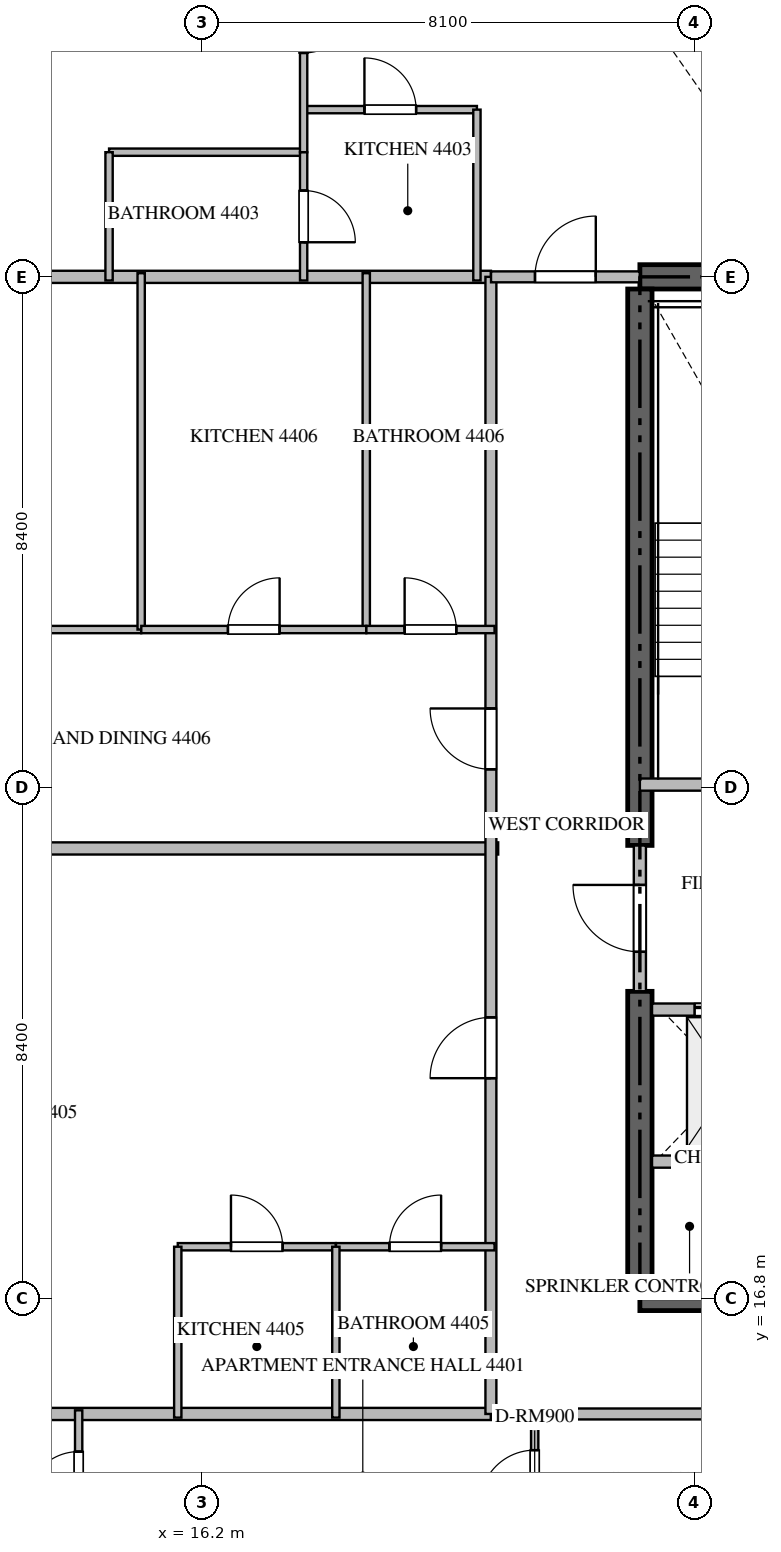
"""IFC4 building model, lengths in metres.
Left out: names, types, materials, properties, quantities, classifications, styles, units other than length and angle.
Written with IfcOpenShell. Run it as: python <this file> out.ifc"""

import sys

from ifc_helpers import new_model, si_unit, direction, frame, frame_2d, origin, place, context, subcontext, project, spatial, rectangle, extrude, source, transform, mapped, element, fill, save


model = new_model("IFC4")
c1 = context("Model", 3, precision=1e-05, world=origin(), true_north=direction((0.0, 1.0)))
c2 = subcontext(c1, "Body", "Model", "MODEL_VIEW")
j1 = project(units=[si_unit("LENGTHUNIT", "METRE"), si_unit("PLANEANGLEUNIT", "RADIAN")], contexts=[c1])
p1 = place(None, origin())
s1 = spatial("IfcSite", under=j1, at=p1, CompositionType="ELEMENT")
p2 = place(p1, origin())
s2 = spatial("IfcBuilding", under=s1, at=p2, CompositionType="ELEMENT")
p3 = place(p2, frame((0.0, 0.0, 176.4)))
s3 = spatial("IfcBuildingStorey", under=s2, at=p3, CompositionType="ELEMENT", Elevation=176.4)
for number, where, z_axis, x_axis in (
    (1, (23.4, 16.8, -0.26), (0.0, 0.0, 1.0), (1.0, 0.0, 0.0)),
    (2, (41.4, 33.6, -0.26), (0.0, 0.0, 1.0), (-1.0, 0.0, 0.0)),
):
    element("IfcWall", number, at=place(p3, frame(where, z_axis=z_axis, x_axis=x_axis)), inside=s3, PredefinedType="SHEAR", context=c2, shape_type="SweptSolid", body=[
        extrude(rectangle(XDim=18.0, YDim=0.4, at=frame_2d((9.0, 0.0))), origin(), (0.0, 0.0, 1.0), 3.748),
    ])
p4 = place(p3, frame((23.4, 17.0, -0.26), z_axis=(0.0, 0.0, 1.0), x_axis=(0.0, 1.0, 0.0)))
e3 = element("IfcWall", 3, at=p4, inside=s3, PredefinedType="SHEAR", context=c2, shape_type="SweptSolid", body=[
    extrude(rectangle(XDim=4.85, YDim=0.4, at=frame_2d((2.425, 0.0))), origin(), (0.0, 0.0, 1.0), 3.748),
])
p5 = place(p3, frame((23.4, 24.25, -0.26), z_axis=(0.0, 0.0, 1.0), x_axis=(0.0, 1.0, 0.0)))
e4 = element("IfcWall", 4, at=p5, inside=s3, PredefinedType="SHEAR", context=c2, shape_type="SweptSolid", body=[
    extrude(rectangle(XDim=9.15, YDim=0.4, at=frame_2d((4.575, 0.0))), origin(), (0.0, 0.0, 1.0), 3.748),
])
p6 = place(p3, frame((23.4, 25.25, 0.0), z_axis=(0.0, 0.0, 1.0), x_axis=(1.0, 0.0, 0.0)))
e5 = element("IfcWall", 5, at=p6, inside=s3, PredefinedType="STANDARD", context=c2, shape_type="SweptSolid", body=[
    extrude(rectangle(XDim=4.45, YDim=0.2, at=frame_2d((2.225, 0.0))), origin(), (0.0, 0.0, 1.0), 3.49),
])
p7 = place(p6, frame((1.65, 0.0, 0.0)))
e6 = element("IfcOpeningElement", 6, at=p7, cuts=e5, PredefinedType="OPENING", context=c2, shape_type="SweptSolid", body=[
    extrude(rectangle(XDim=1.1, YDim=2.15, at=frame_2d((0.55, 1.075))), frame((0.0, 0.11, 0.0), z_axis=(0.0, -1.0, 0.0), x_axis=(1.0, 0.0, 0.0)), (0.0, 0.0, 1.0), 0.22),
])
p8 = place(p3, frame((23.6, 21.55, 0.0), z_axis=(0.0, 0.0, 1.0), x_axis=(1.0, 0.0, 0.0)))
e7 = element("IfcWall", 7, at=p8, inside=s3, PredefinedType="STANDARD", context=c2, shape_type="SweptSolid", body=[
    extrude(rectangle(XDim=2.45, YDim=0.2, at=frame_2d((1.225, 0.0))), origin(), (0.0, 0.0, 1.0), 3.49),
])
p9 = place(p8, frame((0.7, 0.0, 0.0)))
e8 = element("IfcOpeningElement", 8, at=p9, cuts=e7, PredefinedType="OPENING", context=c2, shape_type="SweptSolid", body=[
    extrude(rectangle(XDim=1.2, YDim=2.2, at=frame_2d((0.6, 1.1))), frame((0.0, 0.11, 0.0), z_axis=(0.0, -1.0, 0.0), x_axis=(1.0, 0.0, 0.0)), (0.0, 0.0, 1.0), 0.22),
])
p10 = place(p3, frame((23.6, 19.05, 0.0), z_axis=(0.0, 0.0, 1.0), x_axis=(1.0, 0.0, 0.0)))
e9 = element("IfcWall", 9, at=p10, inside=s3, PredefinedType="STANDARD", context=c2, shape_type="SweptSolid", body=[
    extrude(rectangle(XDim=2.45, YDim=0.2, at=frame_2d((1.225, 0.0))), origin(), (0.0, 0.0, 1.0), 3.49),
])
p11 = place(p3, frame((23.4, 21.852, 0.0), z_axis=(0.0, 0.0, 1.0), x_axis=(0.0, 1.0, 0.0)))
e10 = element("IfcWall", 10, at=p11, inside=s3, PredefinedType="STANDARD", context=c2, shape_type="SweptSolid", body=[
    extrude(rectangle(XDim=2.396, YDim=0.2, at=frame_2d((1.198, 0.0))), origin(), (0.0, 0.0, 1.0), 3.49),
])
p12 = place(p11, frame((0.648, 0.0, 0.0)))
e11 = element("IfcOpeningElement", 11, at=p12, cuts=e10, PredefinedType="OPENING", context=c2, shape_type="SweptSolid", body=[
    extrude(rectangle(XDim=1.1, YDim=2.15, at=frame_2d((0.55, 1.075))), frame((0.0, 0.11, 0.0), z_axis=(0.0, -1.0, 0.0), x_axis=(1.0, 0.0, 0.0)), (0.0, 0.0, 1.0), 0.22),
])
p13 = place(p3, frame((7.882, 24.2, 0.0), z_axis=(0.0, 0.0, 1.0), x_axis=(1.0, 0.0, 0.0)))
e12 = element("IfcWall", 12, at=p13, inside=s3, PredefinedType="PARTITIONING", context=c2, shape_type="SweptSolid", body=[
    extrude(rectangle(XDim=13.188, YDim=0.2, at=frame_2d((6.594, 0.0))), origin(), (0.0, 0.0, 1.0), 3.49),
])
for number, where, z_axis, x_axis in (
    (13, (7.882, 14.9, 0.0), (0.0, 0.0, 1.0), (1.0, 0.0, 0.0)),
    (14, (7.882, 33.6, 0.0), (0.0, 0.0, 1.0), (1.0, 0.0, 0.0)),
):
    element("IfcWall", number, at=place(p3, frame(where, z_axis=z_axis, x_axis=x_axis)), inside=s3, PredefinedType="PARTITIONING", context=c2, shape_type="SweptSolid", body=[
        extrude(rectangle(XDim=13.068, YDim=0.2, at=frame_2d((6.534, 0.0))), origin(), (0.0, 0.0, 1.0), 3.49),
    ])
p14 = place(p3, frame((20.952, 14.9, 0.0), z_axis=(0.0, 0.0, 1.0), x_axis=(1.0, 0.0, 0.0)))
e15 = element("IfcWall", 15, at=p14, inside=s3, PredefinedType="PARTITIONING", context=c2, shape_type="SweptSolid", body=[
    extrude(rectangle(XDim=22.896, YDim=0.18, at=frame_2d((11.448, 0.0))), origin(), (0.0, 0.0, 1.0), 3.49),
])
p15 = place(p14, frame((5.934, 0.0, 0.0)))
e16 = element("IfcOpeningElement", 16, at=p15, cuts=e15, PredefinedType="OPENING", context=c2, shape_type="SweptSolid", body=[
    extrude(rectangle(XDim=1.0, YDim=2.15, at=frame_2d((0.5, 1.075))), frame((0.0, 0.1, 0.0), z_axis=(0.0, -1.0, 0.0), x_axis=(1.0, 0.0, 0.0)), (0.0, 0.0, 1.0), 0.2),
])
p16 = place(p14, frame((16.51, 0.0, 0.0)))
e17 = element("IfcOpeningElement", 17, at=p16, cuts=e15, PredefinedType="OPENING", context=c2, shape_type="SweptSolid", body=[
    extrude(rectangle(XDim=1.0, YDim=2.15, at=frame_2d((0.5, 1.075))), frame((0.0, 0.1, 0.0), z_axis=(0.0, -1.0, 0.0), x_axis=(1.0, 0.0, 0.0)), (0.0, 0.0, 1.0), 0.2),
])
p17 = place(p3, frame((20.95, 14.9, 0.0), z_axis=(0.0, 0.0, 1.0), x_axis=(0.0, 1.0, 0.0)))
e18 = element("IfcWall", 18, at=p17, inside=s3, PredefinedType="PARTITIONING", context=c2, shape_type="SweptSolid", body=[
    extrude(rectangle(XDim=18.7, YDim=0.18, at=frame_2d((9.35, 0.0))), origin(), (0.0, 0.0, 1.0), 3.49),
])
p18 = place(p17, frame((5.522, 0.0, 0.0)))
e19 = element("IfcOpeningElement", 19, at=p18, cuts=e18, PredefinedType="OPENING", context=c2, shape_type="SweptSolid", body=[
    extrude(rectangle(XDim=1.0, YDim=2.15, at=frame_2d((0.5, 1.075))), frame((0.0, 0.1, 0.0), z_axis=(0.0, -1.0, 0.0), x_axis=(1.0, 0.0, 0.0)), (0.0, 0.0, 1.0), 0.2),
])
p19 = place(p17, frame((10.602, 0.0, 0.0)))
e20 = element("IfcOpeningElement", 20, at=p19, cuts=e18, PredefinedType="OPENING", context=c2, shape_type="SweptSolid", body=[
    extrude(rectangle(XDim=1.0, YDim=2.15, at=frame_2d((0.5, 1.075))), frame((0.0, 0.1, 0.0), z_axis=(0.0, -1.0, 0.0), x_axis=(1.0, 0.0, 0.0)), (0.0, 0.0, 1.0), 0.2),
])
p20 = place(p3, frame((20.952, 33.6, 0.0), z_axis=(0.0, 0.0, 1.0), x_axis=(1.0, 0.0, 0.0)))
e21 = element("IfcWall", 21, at=p20, inside=s3, PredefinedType="PARTITIONING", context=c2, shape_type="SweptSolid", body=[
    extrude(rectangle(XDim=2.446, YDim=0.18, at=frame_2d((1.223, 0.0))), origin(), (0.0, 0.0, 1.0), 3.49),
])
p21 = place(p20, frame((0.723, 0.0, 0.0)))
e22 = element("IfcOpeningElement", 22, at=p21, cuts=e21, PredefinedType="OPENING", context=c2, shape_type="SweptSolid", body=[
    extrude(rectangle(XDim=1.0, YDim=2.15, at=frame_2d((0.5, 1.075))), frame((0.0, 0.1, 0.0), z_axis=(0.0, -1.0, 0.0), x_axis=(1.0, 0.0, 0.0)), (0.0, 0.0, 1.0), 0.2),
])
p22 = place(p3, frame((21.67, 12.75, 0.0), z_axis=(0.0, 0.0, 1.0), x_axis=(0.0, 1.0, 0.0)))
e23 = element("IfcWall", 23, at=p22, inside=s3, PredefinedType="PARTITIONING", context=c2, shape_type="SweptSolid", body=[
    extrude(rectangle(XDim=2.21, YDim=0.12, at=frame_2d((1.105, 0.0))), origin(), (0.0, 0.0, 1.0), 3.49),
])
p23 = place(p22, frame((0.655, 0.0, 0.0)))
e24 = element("IfcOpeningElement", 24, at=p23, cuts=e23, PredefinedType="OPENING", context=c2, shape_type="SweptSolid", body=[
    extrude(rectangle(XDim=0.9, YDim=2.1, at=frame_2d((0.45, 1.05))), frame((0.0, 0.07, 0.0), z_axis=(0.0, -1.0, 0.0), x_axis=(1.0, 0.0, 0.0)), (0.0, 0.0, 1.0), 0.14),
])
p24 = place(p3, frame((14.17, 12.752, 0.0), z_axis=(0.0, 0.0, 1.0), x_axis=(0.0, 1.0, 0.0)))
e25 = element("IfcWall", 25, at=p24, inside=s3, PredefinedType="PARTITIONING", context=c2, shape_type="SweptSolid", body=[
    extrude(rectangle(XDim=2.208, YDim=0.12, at=frame_2d((1.104, 0.0))), origin(), (0.0, 0.0, 1.0), 3.49),
])
p25 = place(p24, frame((0.679, 0.0, 0.0)))
e26 = element("IfcOpeningElement", 26, at=p25, cuts=e25, PredefinedType="OPENING", context=c2, shape_type="SweptSolid", body=[
    extrude(rectangle(XDim=0.85, YDim=2.1, at=frame_2d((0.425, 1.05))), frame((0.0, 0.07, 0.0), z_axis=(0.0, -1.0, 0.0), x_axis=(1.0, 0.0, 0.0)), (0.0, 0.0, 1.0), 0.14),
])
p26 = place(p3, frame((17.87, 36.35, 0.0), z_axis=(0.0, 0.0, 1.0), x_axis=(1.0, 0.0, 0.0)))
e27 = element("IfcWall", 27, at=p26, inside=s3, PredefinedType="PARTITIONING", context=c2, shape_type="SweptSolid", body=[
    extrude(rectangle(XDim=2.85, YDim=0.12, at=frame_2d((1.425, 0.0))), origin(), (0.0, 0.0, 1.0), 3.49),
])
p27 = place(p26, frame((1.0, 0.0, 0.0)))
e28 = element("IfcOpeningElement", 28, at=p27, cuts=e27, PredefinedType="OPENING", context=c2, shape_type="SweptSolid", body=[
    extrude(rectangle(XDim=0.85, YDim=2.1, at=frame_2d((0.425, 1.05))), frame((0.0, 0.07, 0.0), z_axis=(0.0, -1.0, 0.0), x_axis=(1.0, 0.0, 0.0)), (0.0, 0.0, 1.0), 0.14),
])
p28 = place(p3, frame((20.72, 36.35, 0.0), z_axis=(0.0, 0.0, 1.0), x_axis=(0.0, -1.0, 0.0)))
e29 = element("IfcWall", 29, at=p28, inside=s3, PredefinedType="PARTITIONING", context=c2, shape_type="SweptSolid", body=[
    extrude(rectangle(XDim=2.81, YDim=0.12, at=frame_2d((1.405, 0.0))), origin(), (0.0, 0.0, 1.0), 3.49),
])
p29 = place(p3, frame((14.67, 35.65, 0.0), z_axis=(0.0, 0.0, 1.0), x_axis=(1.0, 0.0, 0.0)))
e30 = element("IfcWall", 30, at=p29, inside=s3, PredefinedType="PARTITIONING", context=c2, shape_type="SweptSolid", body=[
    extrude(rectangle(XDim=3.2, YDim=0.12, at=frame_2d((1.6, 0.0))), origin(), (0.0, 0.0, 1.0), 3.49),
])
p30 = place(p3, frame((14.67, 35.65, 0.0), z_axis=(0.0, 0.0, 1.0), x_axis=(0.0, -1.0, 0.0)))
e31 = element("IfcWall", 31, at=p30, inside=s3, PredefinedType="PARTITIONING", context=c2, shape_type="SweptSolid", body=[
    extrude(rectangle(XDim=2.11, YDim=0.12, at=frame_2d((1.055, 0.0))), origin(), (0.0, 0.0, 1.0), 3.49),
])
p31 = place(p3, frame((17.87, 39.763, 0.0), z_axis=(0.0, 0.0, 1.0), x_axis=(0.0, -1.0, 0.0)))
e32 = element("IfcWall", 32, at=p31, inside=s3, PredefinedType="PARTITIONING", context=c2, shape_type="SweptSolid", body=[
    extrude(rectangle(XDim=4.113, YDim=0.12, at=frame_2d((2.057, 0.0))), origin(), (0.0, 0.0, 1.0), 3.49),
])
p32 = place(p31, frame((1.631, 0.0, 0.0)))
e33 = element("IfcOpeningElement", 33, at=p32, cuts=e32, PredefinedType="OPENING", context=c2, shape_type="SweptSolid", body=[
    extrude(rectangle(XDim=0.85, YDim=2.1, at=frame_2d((0.425, 1.05))), frame((0.0, 0.07, 0.0), z_axis=(0.0, -1.0, 0.0), x_axis=(1.0, 0.0, 0.0)), (0.0, 0.0, 1.0), 0.14),
])
p33 = place(p3, frame((17.87, 35.648, 0.0), z_axis=(0.0, 0.0, 1.0), x_axis=(0.0, -1.0, 0.0)))
e34 = element("IfcWall", 34, at=p33, inside=s3, PredefinedType="PARTITIONING", context=c2, shape_type="SweptSolid", body=[
    extrude(rectangle(XDim=2.108, YDim=0.12, at=frame_2d((1.054, 0.0))), origin(), (0.0, 0.0, 1.0), 3.49),
])
p34 = place(p33, frame((0.629, 0.0, 0.0)))
e35 = element("IfcOpeningElement", 35, at=p34, cuts=e34, PredefinedType="OPENING", context=c2, shape_type="SweptSolid", body=[
    extrude(rectangle(XDim=0.85, YDim=2.1, at=frame_2d((0.425, 1.05))), frame((0.0, 0.07, 0.0), z_axis=(0.0, -1.0, 0.0), x_axis=(1.0, 0.0, 0.0)), (0.0, 0.0, 1.0), 0.14),
])
p35 = place(p3, frame((15.8, 17.65, 0.0), z_axis=(0.0, 0.0, 1.0), x_axis=(1.0, 0.0, 0.0)))
e36 = element("IfcWall", 36, at=p35, inside=s3, PredefinedType="PARTITIONING", context=c2, shape_type="SweptSolid", body=[
    extrude(rectangle(XDim=2.6, YDim=0.12, at=frame_2d((1.3, 0.0))), origin(), (0.0, 0.0, 1.0), 3.49),
])
p36 = place(p35, frame((0.875, 0.0, 0.0)))
e37 = element("IfcOpeningElement", 37, at=p36, cuts=e36, PredefinedType="OPENING", context=c2, shape_type="SweptSolid", body=[
    extrude(rectangle(XDim=0.85, YDim=2.1, at=frame_2d((0.425, 1.05))), frame((0.0, 0.07, 0.0), z_axis=(0.0, -1.0, 0.0), x_axis=(1.0, 0.0, 0.0)), (0.0, 0.0, 1.0), 0.14),
])
p37 = place(p3, frame((18.402, 17.65, 0.0), z_axis=(0.0, 0.0, 1.0), x_axis=(1.0, 0.0, 0.0)))
e38 = element("IfcWall", 38, at=p37, inside=s3, PredefinedType="PARTITIONING", context=c2, shape_type="SweptSolid", body=[
    extrude(rectangle(XDim=2.608, YDim=0.12, at=frame_2d((1.304, 0.0))), origin(), (0.0, 0.0, 1.0), 3.49),
])
p38 = place(p37, frame((0.879, 0.0, 0.0)))
e39 = element("IfcOpeningElement", 39, at=p38, cuts=e38, PredefinedType="OPENING", context=c2, shape_type="SweptSolid", body=[
    extrude(rectangle(XDim=0.85, YDim=2.1, at=frame_2d((0.425, 1.05))), frame((0.0, 0.07, 0.0), z_axis=(0.0, -1.0, 0.0), x_axis=(1.0, 0.0, 0.0)), (0.0, 0.0, 1.0), 0.14),
])
for number, where, z_axis, x_axis in (
    (40, (18.4, 14.84, 0.0), (0.0, 0.0, 1.0), (0.0, 1.0, 0.0)),
    (41, (15.8, 14.84, 0.0), (0.0, 0.0, 1.0), (0.0, 1.0, 0.0)),
):
    element("IfcWall", number, at=place(p3, frame(where, z_axis=z_axis, x_axis=x_axis)), inside=s3, PredefinedType="PARTITIONING", context=c2, shape_type="SweptSolid", body=[
        extrude(rectangle(XDim=2.81, YDim=0.12, at=frame_2d((1.405, 0.0))), origin(), (0.0, 0.0, 1.0), 3.49),
    ])
p39 = place(p3, frame((7.895, 27.8, 0.0), z_axis=(0.0, 0.0, 1.0), x_axis=(1.0, 0.0, 0.0)))
e42 = element("IfcWall", 42, at=p39, inside=s3, PredefinedType="PARTITIONING", context=c2, shape_type="SweptSolid", body=[
    extrude(rectangle(XDim=7.303, YDim=0.12, at=frame_2d((3.651, 0.0))), origin(), (0.0, 0.0, 1.0), 3.49),
])
p40 = place(p39, frame((3.522, 0.0, 0.0)))
e43 = element("IfcOpeningElement", 43, at=p40, cuts=e42, PredefinedType="OPENING", context=c2, shape_type="SweptSolid", body=[
    extrude(rectangle(XDim=0.9, YDim=2.1, at=frame_2d((0.45, 1.05))), frame((0.0, 0.07, 0.0), z_axis=(0.0, -1.0, 0.0), x_axis=(1.0, 0.0, 0.0)), (0.0, 0.0, 1.0), 0.14),
])
for number, where, z_axis, x_axis in (
    (44, (15.198, 27.8, 0.0), (0.0, 0.0, 1.0), (0.0, 1.0, 0.0)),
    (45, (18.9, 27.8, 0.0), (0.0, 0.0, 1.0), (0.0, 1.0, 0.0)),
):
    element("IfcWall", number, at=place(p3, frame(where, z_axis=z_axis, x_axis=x_axis)), inside=s3, PredefinedType="PARTITIONING", context=c2, shape_type="SweptSolid", body=[
        extrude(rectangle(XDim=5.86, YDim=0.12, at=frame_2d((2.93, 0.0))), origin(), (0.0, 0.0, 1.0), 3.49),
    ])
p41 = place(p3, frame((15.2, 27.8, 0.0), z_axis=(0.0, 0.0, 1.0), x_axis=(1.0, 0.0, 0.0)))
e46 = element("IfcWall", 46, at=p41, inside=s3, PredefinedType="PARTITIONING", context=c2, shape_type="SweptSolid", body=[
    extrude(rectangle(XDim=3.7, YDim=0.12, at=frame_2d((1.85, 0.0))), origin(), (0.0, 0.0, 1.0), 3.49),
])
p42 = place(p41, frame((1.425, 0.0, 0.0)))
e47 = element("IfcOpeningElement", 47, at=p42, cuts=e46, PredefinedType="OPENING", context=c2, shape_type="SweptSolid", body=[
    extrude(rectangle(XDim=0.85, YDim=2.1, at=frame_2d((0.425, 1.05))), frame((0.0, 0.07, 0.0), z_axis=(0.0, -1.0, 0.0), x_axis=(1.0, 0.0, 0.0)), (0.0, 0.0, 1.0), 0.14),
])
p43 = place(p3, frame((18.902, 27.8, 0.0), z_axis=(0.0, 0.0, 1.0), x_axis=(1.0, 0.0, 0.0)))
e48 = element("IfcWall", 48, at=p43, inside=s3, PredefinedType="PARTITIONING", context=c2, shape_type="SweptSolid", body=[
    extrude(rectangle(XDim=2.108, YDim=0.12, at=frame_2d((1.054, 0.0))), origin(), (0.0, 0.0, 1.0), 3.49),
])
p44 = place(p43, frame((0.629, 0.0, 0.0)))
e49 = element("IfcOpeningElement", 49, at=p44, cuts=e48, PredefinedType="OPENING", context=c2, shape_type="SweptSolid", body=[
    extrude(rectangle(XDim=0.85, YDim=2.1, at=frame_2d((0.425, 1.05))), frame((0.0, 0.07, 0.0), z_axis=(0.0, -1.0, 0.0), x_axis=(1.0, 0.0, 0.0)), (0.0, 0.0, 1.0), 0.14),
])
m1 = source(origin(), c2, "Body", "SweptSolid", [
    extrude(rectangle(XDim=1.2, YDim=2.2, at=frame_2d((0.6, 1.1))), frame((0.0, 0.025, 0.0), z_axis=(0.0, -1.0, 0.0), x_axis=(1.0, 0.0, 0.0)), (0.0, 0.0, 1.0), 0.05),
])
p45 = place(p9, origin())
e50 = element("IfcDoor", 50, at=p45, inside=s3, OperationType="DOUBLE_DOOR_SLIDING", PredefinedType="DOOR", context=c2, shape_type="MappedRepresentation", body=[
    mapped(m1, transform((0.0, 0.0, 0.0), scale=1.0)),
])
fill(e8, e50)
m2 = source(origin(), c2, "Body", "SweptSolid", [
    extrude(rectangle(XDim=1.1, YDim=2.15, at=frame_2d((0.55, 1.075))), frame((0.0, 0.025, 0.0), z_axis=(0.0, -1.0, 0.0), x_axis=(1.0, 0.0, 0.0)), (0.0, 0.0, 1.0), 0.05),
])
p46 = place(p12, origin())
e51 = element("IfcDoor", 51, at=p46, inside=s3, OperationType="SINGLE_SWING_RIGHT", PredefinedType="DOOR", context=c2, shape_type="MappedRepresentation", body=[
    mapped(m2, transform((0.0, 0.0, 0.0), scale=1.0)),
])
fill(e11, e51)
m3 = source(origin(), c2, "Body", "SweptSolid", [
    extrude(rectangle(XDim=1.0, YDim=2.15, at=frame_2d((0.5, 1.075))), frame((0.0, 0.025, 0.0), z_axis=(0.0, -1.0, 0.0), x_axis=(1.0, 0.0, 0.0)), (0.0, 0.0, 1.0), 0.05),
])
p47 = place(p18, origin())
e52 = element("IfcDoor", 52, at=p47, inside=s3, OperationType="SINGLE_SWING_LEFT", PredefinedType="DOOR", context=c2, shape_type="MappedRepresentation", body=[
    mapped(m3, transform((0.0, 0.0, 0.0), scale=1.0)),
])
fill(e19, e52)
p48 = place(p19, origin())
e53 = element("IfcDoor", 53, at=p48, inside=s3, OperationType="SINGLE_SWING_RIGHT", PredefinedType="DOOR", context=c2, shape_type="MappedRepresentation", body=[
    mapped(m3, transform((0.0, 0.0, 0.0), scale=1.0)),
])
fill(e20, e53)
p49 = place(p21, origin())
e54 = element("IfcDoor", 54, at=p49, inside=s3, OperationType="SINGLE_SWING_RIGHT", PredefinedType="DOOR", context=c2, shape_type="MappedRepresentation", body=[
    mapped(m3, transform((0.0, 0.0, 0.0), scale=1.0)),
])
fill(e22, e54)
m4 = source(origin(), c2, "Body", "SweptSolid", [
    extrude(rectangle(XDim=0.9, YDim=2.1, at=frame_2d((0.45, 1.05))), frame((0.0, 0.025, 0.0), z_axis=(0.0, -1.0, 0.0), x_axis=(1.0, 0.0, 0.0)), (0.0, 0.0, 1.0), 0.05),
])
p50 = place(p23, origin())
e55 = element("IfcDoor", 55, at=p50, inside=s3, OperationType="SINGLE_SWING_LEFT", PredefinedType="DOOR", context=c2, shape_type="MappedRepresentation", body=[
    mapped(m4, transform((0.0, 0.0, 0.0), scale=1.0)),
])
fill(e24, e55)
m5 = source(origin(), c2, "Body", "SweptSolid", [
    extrude(rectangle(XDim=0.85, YDim=2.1, at=frame_2d((0.425, 1.05))), frame((0.0, 0.025, 0.0), z_axis=(0.0, -1.0, 0.0), x_axis=(1.0, 0.0, 0.0)), (0.0, 0.0, 1.0), 0.05),
])
p51 = place(p25, origin())
e56 = element("IfcDoor", 56, at=p51, inside=s3, OperationType="SINGLE_SWING_LEFT", PredefinedType="DOOR", context=c2, shape_type="MappedRepresentation", body=[
    mapped(m5, transform((0.0, 0.0, 0.0), scale=1.0)),
])
fill(e26, e56)
p52 = place(p27, origin())
e57 = element("IfcDoor", 57, at=p52, inside=s3, OperationType="SINGLE_SWING_LEFT", PredefinedType="DOOR", context=c2, shape_type="MappedRepresentation", body=[
    mapped(m5, transform((0.0, 0.0, 0.0), scale=1.0)),
])
fill(e28, e57)
p53 = place(p32, origin())
e58 = element("IfcDoor", 58, at=p53, inside=s3, OperationType="SINGLE_SWING_LEFT", PredefinedType="DOOR", context=c2, shape_type="MappedRepresentation", body=[
    mapped(m5, transform((0.0, 0.0, 0.0), scale=1.0)),
])
fill(e33, e58)
p54 = place(p34, origin())
e59 = element("IfcDoor", 59, at=p54, inside=s3, OperationType="SINGLE_SWING_RIGHT", PredefinedType="DOOR", context=c2, shape_type="MappedRepresentation", body=[
    mapped(m5, transform((0.0, 0.0, 0.0), scale=1.0)),
])
fill(e35, e59)
p55 = place(p36, origin())
e60 = element("IfcDoor", 60, at=p55, inside=s3, OperationType="SINGLE_SWING_LEFT", PredefinedType="DOOR", context=c2, shape_type="MappedRepresentation", body=[
    mapped(m5, transform((0.0, 0.0, 0.0), scale=1.0)),
])
fill(e37, e60)
p56 = place(p38, origin())
e61 = element("IfcDoor", 61, at=p56, inside=s3, OperationType="SINGLE_SWING_RIGHT", PredefinedType="DOOR", context=c2, shape_type="MappedRepresentation", body=[
    mapped(m5, transform((0.0, 0.0, 0.0), scale=1.0)),
])
fill(e39, e61)
p57 = place(p42, origin())
e62 = element("IfcDoor", 62, at=p57, inside=s3, OperationType="SINGLE_SWING_RIGHT", PredefinedType="DOOR", context=c2, shape_type="MappedRepresentation", body=[
    mapped(m5, transform((0.0, 0.0, 0.0), scale=1.0)),
])
fill(e47, e62)
p58 = place(p44, origin())
e63 = element("IfcDoor", 63, at=p58, inside=s3, OperationType="SINGLE_SWING_LEFT", PredefinedType="DOOR", context=c2, shape_type="MappedRepresentation", body=[
    mapped(m5, transform((0.0, 0.0, 0.0), scale=1.0)),
])
fill(e49, e63)
save(model, sys.argv[1])
